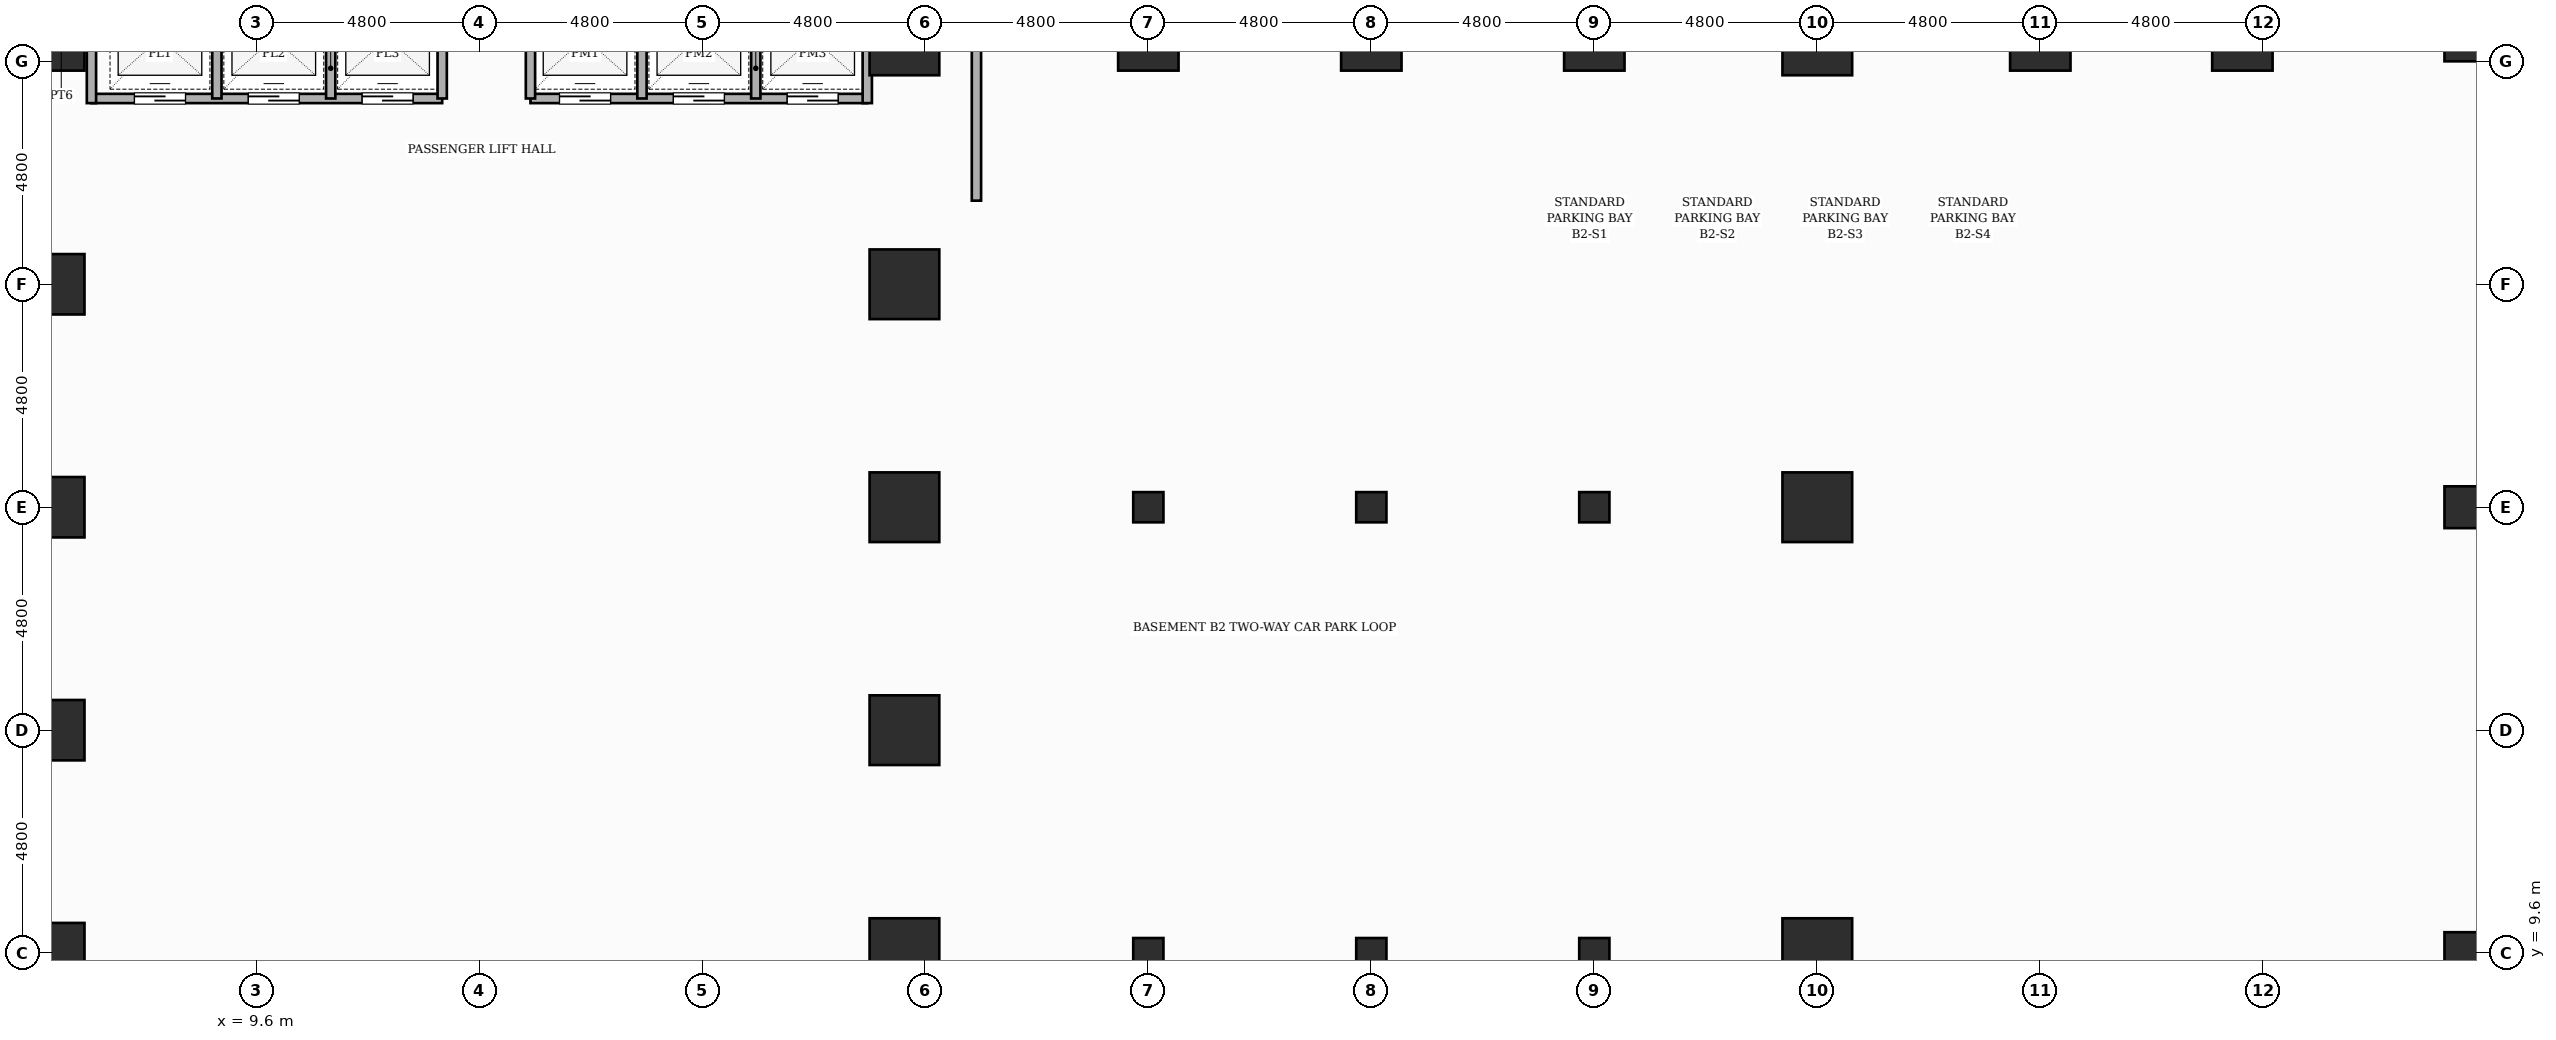
"""IFC4 building model, lengths in metres.
Left out: names, types, materials, properties, quantities, classifications, styles, units other than length and angle.
Written with IfcOpenShell. Run it as: python <this file> out.ifc"""

import sys

from ifc_helpers import new_model, si_unit, direction, frame, frame_2d, origin, origin_2d, place, context, subcontext, project, spatial, rectangle, circle, extrude, element, fill, save


model = new_model("IFC4")
c1 = context("Model", 3, precision=1e-05, world=origin(), true_north=direction((0.0, 1.0)))
c2 = subcontext(c1, "Body", "Model", "MODEL_VIEW")
j1 = project(units=[si_unit("LENGTHUNIT", "METRE"), si_unit("PLANEANGLEUNIT", "RADIAN")], contexts=[c1])
p1 = place(None, origin())
s1 = spatial("IfcSite", under=j1, at=p1, CompositionType="ELEMENT")
p2 = place(p1, origin())
s2 = spatial("IfcBuilding", under=s1, at=p2, CompositionType="ELEMENT")
p3 = place(p2, frame((0.0, 0.0, -8.8)))
s3 = spatial("IfcBuildingStorey", under=s2, at=p3, CompositionType="ELEMENT", Elevation=-8.8)
for number, where, z_axis, x_axis in (
    (1, (5.25, 9.6, 0.0), (0.0, 0.0, 1.0), (1.0, 0.0, 0.0)),
    (2, (5.25, 14.4, 0.0), (0.0, 0.0, 1.0), (1.0, 0.0, 0.0)),
    (3, (5.25, 19.2, 0.0), (0.0, 0.0, 1.0), (1.0, 0.0, 0.0)),
    (4, (5.25, 24.0, 0.0), (0.0, 0.0, 1.0), (1.0, 0.0, 0.0)),
    (5, (5.25, 29.25, 0.0), (0.0, 0.0, 1.0), (1.0, 0.0, 0.0)),
):
    element("IfcColumn", number, at=place(p3, frame(where, z_axis=z_axis, x_axis=x_axis)), inside=s3, PredefinedType="COLUMN", context=c2, shape_type="SweptSolid", body=[
        extrude(rectangle(XDim=1.3, YDim=1.3, at=origin_2d()), origin(), (0.0, 0.0, 1.0), 4.4),
    ])
for number, where, z_axis, x_axis in (
    (6, (23.55, 9.6, 0.0), (0.0, 0.0, 1.0), (1.0, 0.0, 0.0)),
    (7, (23.55, 14.4, 0.0), (0.0, 0.0, 1.0), (1.0, 0.0, 0.0)),
    (8, (23.55, 19.2, 0.0), (0.0, 0.0, 1.0), (1.0, 0.0, 0.0)),
    (9, (23.55, 24.0, 0.0), (0.0, 0.0, 1.0), (1.0, 0.0, 0.0)),
    (10, (23.55, 29.25, 0.0), (0.0, 0.0, 1.0), (1.0, 0.0, 0.0)),
):
    element("IfcColumn", number, at=place(p3, frame(where, z_axis=z_axis, x_axis=x_axis)), inside=s3, PredefinedType="USERDEFINED", context=c2, shape_type="SweptSolid", body=[
        extrude(rectangle(XDim=1.5, YDim=1.5, at=origin_2d()), origin(), (0.0, 0.0, 1.0), 4.4),
    ])
for number, where, z_axis, x_axis in (
    (11, (28.8, 9.6, 0.0), (0.0, 0.0, 1.0), (1.0, 0.0, 0.0)),
    (12, (28.8, 19.2, 0.0), (0.0, 0.0, 1.0), (1.0, 0.0, 0.0)),
):
    element("IfcColumn", number, at=place(p3, frame(where, z_axis=z_axis, x_axis=x_axis)), inside=s3, PredefinedType="PILASTER", context=c2, shape_type="SweptSolid", body=[
        extrude(rectangle(XDim=0.65, YDim=0.65, at=origin_2d()), origin(), (0.0, 0.0, 1.0), 4.4),
    ])
p4 = place(p3, frame((28.8, 29.25, 0.0), z_axis=(0.0, 0.0, 1.0), x_axis=(1.0, 0.0, 0.0)))
e13 = element("IfcColumn", 13, at=p4, inside=s3, PredefinedType="COLUMN", context=c2, shape_type="SweptSolid", body=[
    extrude(rectangle(XDim=1.3, YDim=1.3, at=origin_2d()), origin(), (0.0, 0.0, 1.0), 4.4),
])
for number, where, z_axis, x_axis in (
    (14, (33.6, 9.6, 0.0), (0.0, 0.0, 1.0), (1.0, 0.0, 0.0)),
    (15, (33.6, 19.2, 0.0), (0.0, 0.0, 1.0), (1.0, 0.0, 0.0)),
):
    element("IfcColumn", number, at=place(p3, frame(where, z_axis=z_axis, x_axis=x_axis)), inside=s3, PredefinedType="PILASTER", context=c2, shape_type="SweptSolid", body=[
        extrude(rectangle(XDim=0.65, YDim=0.65, at=origin_2d()), origin(), (0.0, 0.0, 1.0), 4.4),
    ])
p5 = place(p3, frame((33.6, 29.25, 0.0), z_axis=(0.0, 0.0, 1.0), x_axis=(1.0, 0.0, 0.0)))
e16 = element("IfcColumn", 16, at=p5, inside=s3, PredefinedType="COLUMN", context=c2, shape_type="SweptSolid", body=[
    extrude(rectangle(XDim=1.3, YDim=1.3, at=origin_2d()), origin(), (0.0, 0.0, 1.0), 4.4),
])
for number, where, z_axis, x_axis in (
    (17, (38.4, 9.6, 0.0), (0.0, 0.0, 1.0), (1.0, 0.0, 0.0)),
    (18, (38.4, 19.2, 0.0), (0.0, 0.0, 1.0), (1.0, 0.0, 0.0)),
):
    element("IfcColumn", number, at=place(p3, frame(where, z_axis=z_axis, x_axis=x_axis)), inside=s3, PredefinedType="PILASTER", context=c2, shape_type="SweptSolid", body=[
        extrude(rectangle(XDim=0.65, YDim=0.65, at=origin_2d()), origin(), (0.0, 0.0, 1.0), 4.4),
    ])
p6 = place(p3, frame((38.4, 29.25, 0.0), z_axis=(0.0, 0.0, 1.0), x_axis=(1.0, 0.0, 0.0)))
e19 = element("IfcColumn", 19, at=p6, inside=s3, PredefinedType="COLUMN", context=c2, shape_type="SweptSolid", body=[
    extrude(rectangle(XDim=1.3, YDim=1.3, at=origin_2d()), origin(), (0.0, 0.0, 1.0), 4.4),
])
for number, where, z_axis, x_axis in (
    (20, (43.2, 9.6, 0.0), (0.0, 0.0, 1.0), (1.0, 0.0, 0.0)),
    (21, (43.2, 19.2, 0.0), (0.0, 0.0, 1.0), (1.0, 0.0, 0.0)),
    (22, (43.2, 29.25, 0.0), (0.0, 0.0, 1.0), (1.0, 0.0, 0.0)),
):
    element("IfcColumn", number, at=place(p3, frame(where, z_axis=z_axis, x_axis=x_axis)), inside=s3, PredefinedType="USERDEFINED", context=c2, shape_type="SweptSolid", body=[
        extrude(rectangle(XDim=1.5, YDim=1.5, at=origin_2d()), origin(), (0.0, 0.0, 1.0), 4.4),
    ])
for number, where, z_axis, x_axis in (
    (23, (48.0, 29.25, 0.0), (0.0, 0.0, 1.0), (1.0, 0.0, 0.0)),
    (24, (52.35, 29.25, 0.0), (0.0, 0.0, 1.0), (1.0, 0.0, 0.0)),
):
    element("IfcColumn", number, at=place(p3, frame(where, z_axis=z_axis, x_axis=x_axis)), inside=s3, PredefinedType="COLUMN", context=c2, shape_type="SweptSolid", body=[
        extrude(rectangle(XDim=1.3, YDim=1.3, at=origin_2d()), origin(), (0.0, 0.0, 1.0), 4.4),
    ])
for number, where, z_axis, x_axis in (
    (25, (57.15, 9.6, 0.0), (0.0, 0.0, 1.0), (1.0, 0.0, 0.0)),
    (26, (57.15, 19.2, 0.0), (0.0, 0.0, 1.0), (1.0, 0.0, 0.0)),
    (27, (57.15, 29.25, 0.0), (0.0, 0.0, 1.0), (1.0, 0.0, 0.0)),
):
    element("IfcColumn", number, at=place(p3, frame(where, z_axis=z_axis, x_axis=x_axis)), inside=s3, PredefinedType="COLUMN", context=c2, shape_type="SweptSolid", body=[
        extrude(circle(Radius=0.45, at=origin_2d()), origin(), (0.0, 0.0, 1.0), 4.4),
    ])
p7 = place(p3, frame((6.05, 28.0, 0.0), z_axis=(0.0, 0.0, 1.0), x_axis=(1.0, 0.0, 0.0)))
e28 = element("IfcWall", 28, at=p7, inside=s3, PredefinedType="POLYGONAL", context=c2, shape_type="SweptSolid", body=[
    extrude(rectangle(XDim=7.55, YDim=0.2, at=frame_2d((3.775, 0.0))), origin(), (0.0, 0.0, 1.0), 4.08),
])
p8 = place(p7, frame((0.925, 0.0, 0.0)))
e29 = element("IfcOpeningElement", 29, at=p8, cuts=e28, PredefinedType="OPENING", context=c2, shape_type="SweptSolid", body=[
    extrude(rectangle(XDim=1.1, YDim=2.15, at=frame_2d((0.55, 1.075))), frame((0.0, 0.11, 0.0), z_axis=(0.0, -1.0, 0.0), x_axis=(1.0, 0.0, 0.0)), (0.0, 0.0, 1.0), 0.22),
])
p9 = place(p7, frame((3.375, 0.0, 0.0)))
e30 = element("IfcOpeningElement", 30, at=p9, cuts=e28, PredefinedType="OPENING", context=c2, shape_type="SweptSolid", body=[
    extrude(rectangle(XDim=1.1, YDim=2.15, at=frame_2d((0.55, 1.075))), frame((0.0, 0.11, 0.0), z_axis=(0.0, -1.0, 0.0), x_axis=(1.0, 0.0, 0.0)), (0.0, 0.0, 1.0), 0.22),
])
p10 = place(p7, frame((5.825, 0.0, 0.0)))
e31 = element("IfcOpeningElement", 31, at=p10, cuts=e28, PredefinedType="OPENING", context=c2, shape_type="SweptSolid", body=[
    extrude(rectangle(XDim=1.1, YDim=2.15, at=frame_2d((0.55, 1.075))), frame((0.0, 0.11, 0.0), z_axis=(0.0, -1.0, 0.0), x_axis=(1.0, 0.0, 0.0)), (0.0, 0.0, 1.0), 0.22),
])
p11 = place(p3, frame((15.5, 28.0, 0.0), z_axis=(0.0, 0.0, 1.0), x_axis=(1.0, 0.0, 0.0)))
e32 = element("IfcWall", 32, at=p11, inside=s3, PredefinedType="POLYGONAL", context=c2, shape_type="SweptSolid", body=[
    extrude(rectangle(XDim=7.25, YDim=0.2, at=frame_2d((3.625, 0.0))), origin(), (0.0, 0.0, 1.0), 4.08),
])
p12 = place(p11, frame((0.625, 0.0, 0.0)))
e33 = element("IfcOpeningElement", 33, at=p12, cuts=e32, PredefinedType="OPENING", context=c2, shape_type="SweptSolid", body=[
    extrude(rectangle(XDim=1.1, YDim=2.15, at=frame_2d((0.55, 1.075))), frame((0.0, 0.11, 0.0), z_axis=(0.0, -1.0, 0.0), x_axis=(1.0, 0.0, 0.0)), (0.0, 0.0, 1.0), 0.22),
])
p13 = place(p11, frame((3.075, 0.0, 0.0)))
e34 = element("IfcOpeningElement", 34, at=p13, cuts=e32, PredefinedType="OPENING", context=c2, shape_type="SweptSolid", body=[
    extrude(rectangle(XDim=1.1, YDim=2.15, at=frame_2d((0.55, 1.075))), frame((0.0, 0.11, 0.0), z_axis=(0.0, -1.0, 0.0), x_axis=(1.0, 0.0, 0.0)), (0.0, 0.0, 1.0), 0.22),
])
p14 = place(p11, frame((5.525, 0.0, 0.0)))
e35 = element("IfcOpeningElement", 35, at=p14, cuts=e32, PredefinedType="OPENING", context=c2, shape_type="SweptSolid", body=[
    extrude(rectangle(XDim=1.1, YDim=2.15, at=frame_2d((0.55, 1.075))), frame((0.0, 0.11, 0.0), z_axis=(0.0, -1.0, 0.0), x_axis=(1.0, 0.0, 0.0)), (0.0, 0.0, 1.0), 0.22),
])
for number, where, z_axis, x_axis in (
    (36, (6.05, 27.9, 0.0), (0.0, 0.0, 1.0), (0.0, 1.0, 0.0)),
    (37, (22.75, 27.9, 0.0), (0.0, 0.0, 1.0), (0.0, 1.0, 0.0)),
):
    element("IfcWall", number, at=place(p3, frame(where, z_axis=z_axis, x_axis=x_axis)), inside=s3, PredefinedType="POLYGONAL", context=c2, shape_type="SweptSolid", body=[
        extrude(rectangle(XDim=3.0, YDim=0.2, at=frame_2d((1.5, 0.0))), origin(), (0.0, 0.0, 1.0), 4.08),
    ])
for number, where, z_axis, x_axis in (
    (38, (13.6, 28.0, 0.0), (0.0, 0.0, 1.0), (0.0, 1.0, 0.0)),
    (39, (15.5, 28.0, 0.0), (0.0, 0.0, 1.0), (0.0, 1.0, 0.0)),
    (40, (8.75, 28.0, 0.0), (0.0, 0.0, 1.0), (0.0, 1.0, 0.0)),
    (41, (11.2, 28.0, 0.0), (0.0, 0.0, 1.0), (0.0, 1.0, 0.0)),
    (42, (17.9, 28.0, 0.0), (0.0, 0.0, 1.0), (0.0, 1.0, 0.0)),
    (43, (20.35, 28.0, 0.0), (0.0, 0.0, 1.0), (0.0, 1.0, 0.0)),
):
    element("IfcWall", number, at=place(p3, frame(where, z_axis=z_axis, x_axis=x_axis)), inside=s3, PredefinedType="POLYGONAL", context=c2, shape_type="SweptSolid", body=[
        extrude(rectangle(XDim=2.9, YDim=0.2, at=frame_2d((1.45, 0.0))), origin(), (0.0, 0.0, 1.0), 4.08),
    ])
p15 = place(p3, frame((25.1, 25.8, 0.0), z_axis=(0.0, 0.0, 1.0), x_axis=(0.0, 1.0, 0.0)))
e44 = element("IfcWall", 44, at=p15, inside=s3, PredefinedType="PARTITIONING", context=c2, shape_type="SweptSolid", body=[
    extrude(rectangle(XDim=10.25, YDim=0.2, at=frame_2d((5.125, 0.0))), origin(), (0.0, 0.0, 1.0), 4.08),
])
p16 = place(p8, origin())
e45 = element("IfcDoor", 45, at=p16, inside=s3, OperationType="SLIDING_TO_LEFT", PredefinedType="DOOR", context=c2, shape_type="SweptSolid", body=[
    extrude(rectangle(XDim=1.1, YDim=2.15, at=frame_2d((0.55, 1.075))), frame((0.0, 0.025, 0.0), z_axis=(0.0, -1.0, 0.0), x_axis=(1.0, 0.0, 0.0)), (0.0, 0.0, 1.0), 0.05),
])
fill(e29, e45)
p17 = place(p9, origin())
e46 = element("IfcDoor", 46, at=p17, inside=s3, OperationType="SLIDING_TO_RIGHT", PredefinedType="DOOR", context=c2, shape_type="SweptSolid", body=[
    extrude(rectangle(XDim=1.1, YDim=2.15, at=frame_2d((0.55, 1.075))), frame((0.0, 0.025, 0.0), z_axis=(0.0, -1.0, 0.0), x_axis=(1.0, 0.0, 0.0)), (0.0, 0.0, 1.0), 0.05),
])
fill(e30, e46)
p18 = place(p10, origin())
e47 = element("IfcDoor", 47, at=p18, inside=s3, OperationType="SLIDING_TO_LEFT", PredefinedType="DOOR", context=c2, shape_type="SweptSolid", body=[
    extrude(rectangle(XDim=1.1, YDim=2.15, at=frame_2d((0.55, 1.075))), frame((0.0, 0.025, 0.0), z_axis=(0.0, -1.0, 0.0), x_axis=(1.0, 0.0, 0.0)), (0.0, 0.0, 1.0), 0.05),
])
fill(e31, e47)
p19 = place(p12, origin())
e48 = element("IfcDoor", 48, at=p19, inside=s3, OperationType="SLIDING_TO_RIGHT", PredefinedType="DOOR", context=c2, shape_type="SweptSolid", body=[
    extrude(rectangle(XDim=1.1, YDim=2.15, at=frame_2d((0.55, 1.075))), frame((0.0, 0.025, 0.0), z_axis=(0.0, -1.0, 0.0), x_axis=(1.0, 0.0, 0.0)), (0.0, 0.0, 1.0), 0.05),
])
fill(e33, e48)
p20 = place(p13, origin())
e49 = element("IfcDoor", 49, at=p20, inside=s3, OperationType="SLIDING_TO_LEFT", PredefinedType="DOOR", context=c2, shape_type="SweptSolid", body=[
    extrude(rectangle(XDim=1.1, YDim=2.15, at=frame_2d((0.55, 1.075))), frame((0.0, 0.025, 0.0), z_axis=(0.0, -1.0, 0.0), x_axis=(1.0, 0.0, 0.0)), (0.0, 0.0, 1.0), 0.05),
])
fill(e34, e49)
p21 = place(p14, origin())
e50 = element("IfcDoor", 50, at=p21, inside=s3, OperationType="SLIDING_TO_RIGHT", PredefinedType="DOOR", context=c2, shape_type="SweptSolid", body=[
    extrude(rectangle(XDim=1.1, YDim=2.15, at=frame_2d((0.55, 1.075))), frame((0.0, 0.025, 0.0), z_axis=(0.0, -1.0, 0.0), x_axis=(1.0, 0.0, 0.0)), (0.0, 0.0, 1.0), 0.05),
])
fill(e35, e50)
save(model, sys.argv[1])
